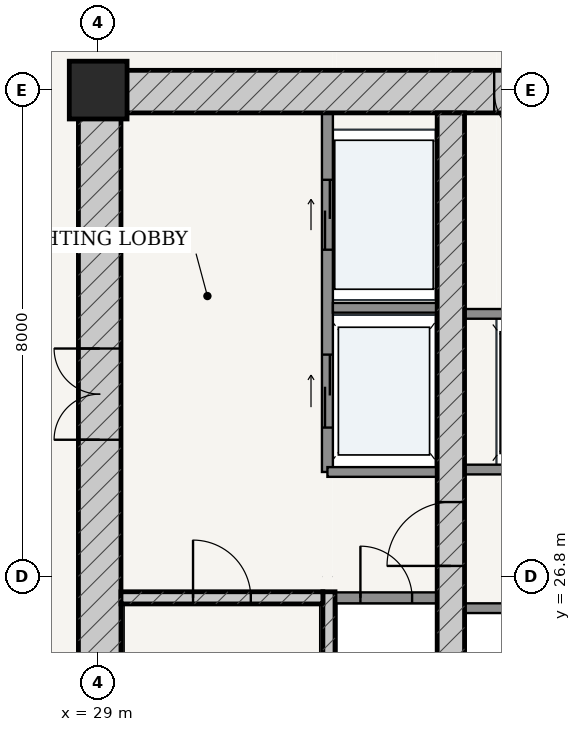
"""IFC4 building model, lengths in metres.
Left out: names, types, materials, properties, quantities, classifications, styles, units other than length and angle.
Written with IfcOpenShell. Run it as: python <this file> out.ifc"""

import sys

from ifc_helpers import new_model, si_unit, direction, frame, frame_2d, origin, origin_2d, place, context, subcontext, project, spatial, rectangle, extrude, source, transform, mapped, element, fill, save


model = new_model("IFC4")
c1 = context("Model", 3, precision=1e-05, world=origin(), true_north=direction((-0.2419218956, 0.970295726276)))
c2 = subcontext(c1, "Body", "Model", "MODEL_VIEW")
j1 = project(units=[si_unit("LENGTHUNIT", "METRE"), si_unit("PLANEANGLEUNIT", "RADIAN")], contexts=[c1])
p1 = place(None, origin())
s1 = spatial("IfcSite", under=j1, at=p1, CompositionType="ELEMENT")
p2 = place(p1, origin())
s2 = spatial("IfcBuilding", under=s1, at=p2, CompositionType="ELEMENT")
p3 = place(p2, frame((0.0, 0.0, 119.4)))
s3 = spatial("IfcBuildingStorey", under=s2, at=p3, CompositionType="ELEMENT", Elevation=119.4)
p4 = place(p3, frame((29.0, 34.8, 0.0), z_axis=(0.0, 0.0, 1.0), x_axis=(1.0, 0.0, 0.0)))
e1 = element("IfcColumn", 1, at=p4, inside=s3, PredefinedType="COLUMN", context=c2, shape_type="SweptSolid", body=[
    extrude(rectangle(XDim=0.95, YDim=0.95, at=origin_2d()), origin(), (0.0, 0.0, 1.0), 3.6),
])
p5 = place(p3, frame((28.675, 34.775, 0.0), z_axis=(0.0, 0.0, 1.0), x_axis=(1.0, 0.0, 0.0)))
e2 = element("IfcWall", 2, at=p5, inside=s3, PredefinedType="SHEAR", context=c2, shape_type="SweptSolid", body=[
    extrude(rectangle(XDim=18.65, YDim=0.7, at=frame_2d((9.325, 0.0))), origin(), (0.0, 0.0, 1.0), 3.325),
])
p6 = place(p5, frame((6.837, 0.0, 0.0)))
e3 = element("IfcOpeningElement", 3, at=p6, cuts=e2, PredefinedType="OPENING", context=c2, shape_type="SweptSolid", body=[
    extrude(rectangle(XDim=0.85, YDim=2.1, at=frame_2d((0.425, 1.05))), frame((0.0, 0.36, 0.0), z_axis=(0.0, -1.0, 0.0), x_axis=(1.0, 0.0, 0.0)), (0.0, 0.0, 1.0), 0.72),
])
p7 = place(p5, frame((8.895, 0.0, 0.0)))
e4 = element("IfcOpeningElement", 4, at=p7, cuts=e2, PredefinedType="OPENING", context=c2, shape_type="SweptSolid", body=[
    extrude(rectangle(XDim=0.86, YDim=2.1, at=frame_2d((0.43, 1.05))), frame((0.0, 0.36, 0.0), z_axis=(0.0, -1.0, 0.0), x_axis=(1.0, 0.0, 0.0)), (0.0, 0.0, 1.0), 0.72),
])
p8 = place(p5, frame((10.962, 0.0, 0.0)))
e5 = element("IfcOpeningElement", 5, at=p8, cuts=e2, PredefinedType="OPENING", context=c2, shape_type="SweptSolid", body=[
    extrude(rectangle(XDim=0.85, YDim=2.1, at=frame_2d((0.425, 1.05))), frame((0.0, 0.36, 0.0), z_axis=(0.0, -1.0, 0.0), x_axis=(1.0, 0.0, 0.0)), (0.0, 0.0, 1.0), 0.72),
])
p9 = place(p3, frame((29.025, 19.175, 0.0), z_axis=(0.0, 0.0, 1.0), x_axis=(0.0, 1.0, 0.0)))
e6 = element("IfcWall", 6, at=p9, inside=s3, PredefinedType="SHEAR", context=c2, shape_type="SweptSolid", body=[
    extrude(rectangle(XDim=15.25, YDim=0.7, at=frame_2d((7.625, 0.0))), origin(), (0.0, 0.0, 1.0), 3.325),
])
p10 = place(p9, frame((9.875, 0.0, 0.0)))
e7 = element("IfcOpeningElement", 7, at=p10, cuts=e6, PredefinedType="OPENING", context=c2, shape_type="SweptSolid", body=[
    extrude(rectangle(XDim=1.5, YDim=2.2, at=frame_2d((0.75, 1.1))), frame((0.0, 0.36, 0.0), z_axis=(0.0, -1.0, 0.0), x_axis=(1.0, 0.0, 0.0)), (0.0, 0.0, 1.0), 0.72),
])
p11 = place(p3, frame((32.795, 19.175, 0.0), z_axis=(0.0, 0.0, 1.0), x_axis=(0.0, 1.0, 0.0)))
e8 = element("IfcWall", 8, at=p11, inside=s3, PredefinedType="SOLIDWALL", context=c2, shape_type="SweptSolid", body=[
    extrude(rectangle(XDim=7.375, YDim=0.2, at=frame_2d((3.688, 0.0))), origin(), (0.0, 0.0, 1.0), 3.325),
])
p12 = place(p3, frame((29.375, 26.45, 0.0), z_axis=(0.0, 0.0, 1.0), x_axis=(1.0, 0.0, 0.0)))
e9 = element("IfcWall", 9, at=p12, inside=s3, PredefinedType="SOLIDWALL", context=c2, shape_type="SweptSolid", body=[
    extrude(rectangle(XDim=3.32, YDim=0.2, at=frame_2d((1.66, 0.0))), origin(), (0.0, 0.0, 1.0), 3.325),
])
p13 = place(p12, frame((1.185, 0.0, 0.0)))
e10 = element("IfcOpeningElement", 10, at=p13, cuts=e9, PredefinedType="OPENING", context=c2, shape_type="SweptSolid", body=[
    extrude(rectangle(XDim=0.95, YDim=2.15, at=frame_2d((0.475, 1.075))), frame((0.0, 0.11, 0.0), z_axis=(0.0, -1.0, 0.0), x_axis=(1.0, 0.0, 0.0)), (0.0, 0.0, 1.0), 0.22),
])
p14 = place(p3, frame((34.8, 19.175, 0.0), z_axis=(0.0, 0.0, 1.0), x_axis=(0.0, 1.0, 0.0)))
e11 = element("IfcWall", 11, at=p14, inside=s3, PredefinedType="SHEAR", context=c2, shape_type="SweptSolid", body=[
    extrude(rectangle(XDim=15.25, YDim=0.45, at=frame_2d((7.625, 0.0))), origin(), (0.0, 0.0, 1.0), 3.325),
])
p15 = place(p14, frame((7.8, 0.0, 0.0)))
e12 = element("IfcOpeningElement", 12, at=p15, cuts=e11, PredefinedType="OPENING", context=c2, shape_type="SweptSolid", body=[
    extrude(rectangle(XDim=1.05, YDim=2.15, at=frame_2d((0.525, 1.075))), frame((0.0, 0.235, 0.0), z_axis=(0.0, -1.0, 0.0), x_axis=(1.0, 0.0, 0.0)), (0.0, 0.0, 1.0), 0.47),
])
p16 = place(p3, frame((32.9, 26.45, 0.0), z_axis=(0.0, 0.0, 1.0), x_axis=(1.0, 0.0, 0.0)))
e13 = element("IfcWall", 13, at=p16, inside=s3, PredefinedType="PARTITIONING", context=c2, shape_type="SweptSolid", body=[
    extrude(rectangle(XDim=1.675, YDim=0.18, at=frame_2d((0.837, 0.0))), origin(), (0.0, 0.0, 1.0), 3.325),
])
p17 = place(p16, frame((0.413, 0.0, 0.0)))
e14 = element("IfcOpeningElement", 14, at=p17, cuts=e13, PredefinedType="OPENING", context=c2, shape_type="SweptSolid", body=[
    extrude(rectangle(XDim=0.85, YDim=2.1, at=frame_2d((0.425, 1.05))), frame((0.0, 0.1, 0.0), z_axis=(0.0, -1.0, 0.0), x_axis=(1.0, 0.0, 0.0)), (0.0, 0.0, 1.0), 0.2),
])
p18 = place(p3, frame((32.77, 28.52, 0.0), z_axis=(0.0, 0.0, 1.0), x_axis=(0.0, 1.0, 0.0)))
e15 = element("IfcWall", 15, at=p18, inside=s3, PredefinedType="PARTITIONING", context=c2, shape_type="SweptSolid", body=[
    extrude(rectangle(XDim=5.905, YDim=0.18, at=frame_2d((2.953, 0.0))), origin(), (0.0, 0.0, 1.0), 3.325),
])
p19 = place(p18, frame((3.655, 0.0, 0.0)))
e16 = element("IfcOpeningElement", 16, at=p19, cuts=e15, PredefinedType="OPENING", context=c2, shape_type="SweptSolid", body=[
    extrude(rectangle(XDim=1.15, YDim=2.2, at=frame_2d((0.575, 1.1))), frame((0.0, 0.1, 0.0), z_axis=(0.0, -1.0, 0.0), x_axis=(1.0, 0.0, 0.0)), (0.0, 0.0, 1.0), 0.2),
])
p20 = place(p18, frame((0.73, 0.0, 0.0)))
e17 = element("IfcOpeningElement", 17, at=p20, cuts=e15, PredefinedType="OPENING", context=c2, shape_type="SweptSolid", body=[
    extrude(rectangle(XDim=1.2, YDim=2.25, at=frame_2d((0.6, 1.125))), frame((0.0, 0.1, 0.0), z_axis=(0.0, -1.0, 0.0), x_axis=(1.0, 0.0, 0.0)), (0.0, 0.0, 1.0), 0.2),
])
p21 = place(p3, frame((32.86, 31.22, 0.0), z_axis=(0.0, 0.0, 1.0), x_axis=(1.0, 0.0, 0.0)))
e18 = element("IfcWall", 18, at=p21, inside=s3, PredefinedType="PARTITIONING", context=c2, shape_type="SweptSolid", body=[
    extrude(rectangle(XDim=1.715, YDim=0.16, at=frame_2d((0.857, 0.0))), origin(), (0.0, 0.0, 1.0), 3.325),
])
p22 = place(p3, frame((32.77, 28.52, 0.0), z_axis=(0.0, 0.0, 1.0), x_axis=(1.0, 0.0, 0.0)))
e19 = element("IfcWall", 19, at=p22, inside=s3, PredefinedType="PARTITIONING", context=c2, shape_type="SweptSolid", body=[
    extrude(rectangle(XDim=1.805, YDim=0.16, at=frame_2d((0.902, 0.0))), origin(), (0.0, 0.0, 1.0), 3.325),
])
p23 = place(p3, frame((35.025, 28.56, 0.0), z_axis=(0.0, 0.0, 1.0), x_axis=(1.0, 0.0, 0.0)))
e20 = element("IfcWall", 20, at=p23, inside=s3, PredefinedType="PARTITIONING", context=c2, shape_type="SweptSolid", body=[
    extrude(rectangle(XDim=5.95, YDim=0.16, at=frame_2d((2.975, 0.0))), origin(), (0.0, 0.0, 1.0), 3.325),
])
p24 = place(p23, frame((0.76, 0.0, 0.0)))
e21 = element("IfcOpeningElement", 21, at=p24, cuts=e20, PredefinedType="OPENING", context=c2, shape_type="SweptSolid", body=[
    extrude(rectangle(XDim=1.1, YDim=2.2, at=frame_2d((0.55, 1.1))), frame((0.0, 0.09, 0.0), z_axis=(0.0, -1.0, 0.0), x_axis=(1.0, 0.0, 0.0)), (0.0, 0.0, 1.0), 0.18),
])
p25 = place(p23, frame((2.425, 0.0, 0.0)))
e22 = element("IfcOpeningElement", 22, at=p25, cuts=e20, PredefinedType="OPENING", context=c2, shape_type="SweptSolid", body=[
    extrude(rectangle(XDim=1.1, YDim=2.2, at=frame_2d((0.55, 1.1))), frame((0.0, 0.09, 0.0), z_axis=(0.0, -1.0, 0.0), x_axis=(1.0, 0.0, 0.0)), (0.0, 0.0, 1.0), 0.18),
])
p26 = place(p23, frame((4.09, 0.0, 0.0)))
e23 = element("IfcOpeningElement", 23, at=p26, cuts=e20, PredefinedType="OPENING", context=c2, shape_type="SweptSolid", body=[
    extrude(rectangle(XDim=1.1, YDim=2.2, at=frame_2d((0.55, 1.1))), frame((0.0, 0.09, 0.0), z_axis=(0.0, -1.0, 0.0), x_axis=(1.0, 0.0, 0.0)), (0.0, 0.0, 1.0), 0.18),
])
for number, where, z_axis, x_axis in (
    (24, (35.025, 31.12, 0.0), (0.0, 0.0, 1.0), (1.0, 0.0, 0.0)),
    (25, (35.025, 26.28, 0.0), (0.0, 0.0, 1.0), (1.0, 0.0, 0.0)),
):
    element("IfcWall", number, at=place(p3, frame(where, z_axis=z_axis, x_axis=x_axis)), inside=s3, PredefinedType="PARTITIONING", context=c2, shape_type="SweptSolid", body=[
        extrude(rectangle(XDim=5.95, YDim=0.16, at=frame_2d((2.975, 0.0))), origin(), (0.0, 0.0, 1.0), 3.325),
    ])
m1 = source(origin(), c2, "Body", "SweptSolid", [
    extrude(rectangle(XDim=1.5, YDim=2.2, at=frame_2d((0.75, 1.1))), frame((0.0, 0.025, 0.0), z_axis=(0.0, -1.0, 0.0), x_axis=(1.0, 0.0, 0.0)), (0.0, 0.0, 1.0), 0.05),
])
p27 = place(p10, origin())
e26 = element("IfcDoor", 26, at=p27, inside=s3, OperationType="DOUBLE_DOOR_SINGLE_SWING", PredefinedType="DOOR", context=c2, shape_type="MappedRepresentation", body=[
    mapped(m1, transform((0.0, 0.0, 0.0), scale=1.0)),
])
fill(e7, e26)
m2 = source(origin(), c2, "Body", "SweptSolid", [
    extrude(rectangle(XDim=1.05, YDim=2.15, at=frame_2d((0.525, 1.075))), frame((0.0, 0.025, 0.0), z_axis=(0.0, -1.0, 0.0), x_axis=(1.0, 0.0, 0.0)), (0.0, 0.0, 1.0), 0.05),
])
p28 = place(p15, origin())
e27 = element("IfcDoor", 27, at=p28, inside=s3, OperationType="SINGLE_SWING_LEFT", PredefinedType="DOOR", context=c2, shape_type="MappedRepresentation", body=[
    mapped(m2, transform((0.0, 0.0, 0.0), scale=1.0)),
])
fill(e12, e27)
m3 = source(origin(), c2, "Body", "SweptSolid", [
    extrude(rectangle(XDim=0.95, YDim=2.15, at=frame_2d((0.475, 1.075))), frame((0.0, 0.025, 0.0), z_axis=(0.0, -1.0, 0.0), x_axis=(1.0, 0.0, 0.0)), (0.0, 0.0, 1.0), 0.05),
])
p29 = place(p13, origin())
e28 = element("IfcDoor", 28, at=p29, inside=s3, OperationType="SINGLE_SWING_LEFT", PredefinedType="DOOR", context=c2, shape_type="MappedRepresentation", body=[
    mapped(m3, transform((0.0, 0.0, 0.0), scale=1.0)),
])
fill(e10, e28)
m4 = source(origin(), c2, "Body", "SweptSolid", [
    extrude(rectangle(XDim=0.85, YDim=2.1, at=frame_2d((0.425, 1.05))), frame((0.0, 0.025, 0.0), z_axis=(0.0, -1.0, 0.0), x_axis=(1.0, 0.0, 0.0)), (0.0, 0.0, 1.0), 0.05),
])
p30 = place(p17, origin())
e29 = element("IfcDoor", 29, at=p30, inside=s3, OperationType="SINGLE_SWING_LEFT", PredefinedType="DOOR", context=c2, shape_type="MappedRepresentation", body=[
    mapped(m4, transform((0.0, 0.0, 0.0), scale=1.0)),
])
fill(e14, e29)
p31 = place(p6, frame((0.85, 0.0, 0.0), z_axis=(0.0, 0.0, 1.0), x_axis=(-1.0, 0.0, 0.0)))
e30 = element("IfcDoor", 30, at=p31, inside=s3, OperationType="SINGLE_SWING_LEFT", PredefinedType="DOOR", context=c2, shape_type="MappedRepresentation", body=[
    mapped(m4, transform((0.0, 0.0, 0.0), scale=1.0)),
])
fill(e3, e30)
m5 = source(origin(), c2, "Body", "SweptSolid", [
    extrude(rectangle(XDim=1.15, YDim=2.2, at=frame_2d((0.575, 1.1))), frame((0.0, 0.025, 0.0), z_axis=(0.0, -1.0, 0.0), x_axis=(1.0, 0.0, 0.0)), (0.0, 0.0, 1.0), 0.05),
])
p32 = place(p19, origin())
e31 = element("IfcDoor", 31, at=p32, inside=s3, OperationType="DOUBLE_DOOR_SLIDING", PredefinedType="DOOR", context=c2, shape_type="MappedRepresentation", body=[
    mapped(m5, transform((0.0, 0.0, 0.0), scale=1.0)),
])
fill(e16, e31)
m6 = source(origin(), c2, "Body", "SweptSolid", [
    extrude(rectangle(XDim=1.2, YDim=2.25, at=frame_2d((0.6, 1.125))), frame((0.0, 0.025, 0.0), z_axis=(0.0, -1.0, 0.0), x_axis=(1.0, 0.0, 0.0)), (0.0, 0.0, 1.0), 0.05),
])
p33 = place(p20, origin())
e32 = element("IfcDoor", 32, at=p33, inside=s3, OperationType="DOUBLE_DOOR_SLIDING", PredefinedType="DOOR", context=c2, shape_type="MappedRepresentation", body=[
    mapped(m6, transform((0.0, 0.0, 0.0), scale=1.0)),
])
fill(e17, e32)
save(model, sys.argv[1])
